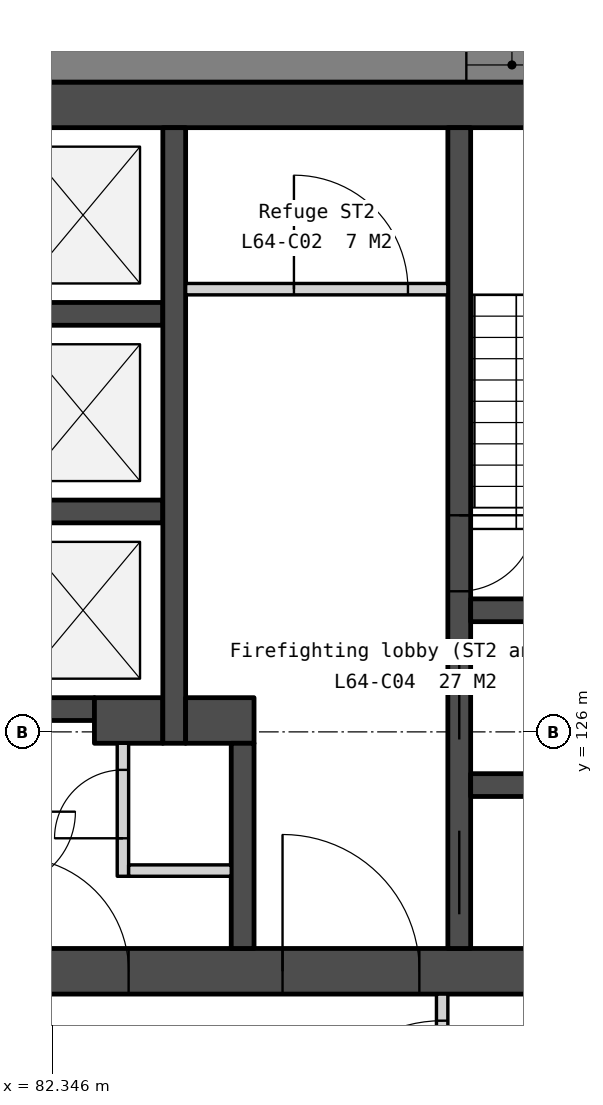
"""IFC4 building model, lengths in metres.
Left out: names, types, materials, properties, quantities, classifications, styles, units other than length and angle.
Written with IfcOpenShell. Run it as: python <this file> out.ifc"""

import sys

from ifc_helpers import new_model, si_unit, direction, frame, frame_2d, origin, place, context, subcontext, project, spatial, polyline, rectangle, outline, extrude, element, fill, save


model = new_model("IFC4")
c1 = context("Model", 3, precision=1e-05, world=origin(), true_north=direction((0.0, 1.0)))
c2 = subcontext(c1, "Body", "Model", "MODEL_VIEW")
j1 = project(units=[si_unit("LENGTHUNIT", "METRE"), si_unit("PLANEANGLEUNIT", "RADIAN")], contexts=[c1])
p1 = place(None, origin())
s1 = spatial("IfcSite", under=j1, at=p1, CompositionType="ELEMENT")
p2 = place(p1, origin())
s2 = spatial("IfcBuilding", under=s1, at=p2, CompositionType="ELEMENT")
p3 = place(p2, frame((0.0, 0.0, 262.1)))
s3 = spatial("IfcBuildingStorey", under=s2, at=p3, CompositionType="ELEMENT", Elevation=262.1)
p4 = place(p3, frame((69.0, 134.25, 0.0), z_axis=(0.0, 0.0, 1.0), x_axis=(1.0, 0.0, 0.0)))
e1 = element("IfcWall", 1, at=p4, inside=s3, PredefinedType="SOLIDWALL", context=c2, shape_type="SweptSolid", body=[
    extrude(rectangle(XDim=22.0, YDim=0.6, at=frame_2d((11.0, 0.0))), origin(), (0.0, 0.0, 1.0), 3.75),
])
p5 = place(p3, frame((69.0, 122.85, 0.0), z_axis=(0.0, 0.0, 1.0), x_axis=(1.0, 0.0, 0.0)))
e2 = element("IfcWall", 2, at=p5, inside=s3, PredefinedType="SOLIDWALL", context=c2, shape_type="SweptSolid", body=[
    extrude(rectangle(XDim=22.0, YDim=0.6, at=frame_2d((11.0, 0.0))), origin(), (0.0, 0.0, 1.0), 3.75),
])
p6 = place(p5, frame((16.375, 0.0, 0.0)))
e3 = element("IfcOpeningElement", 3, at=p6, cuts=e2, PredefinedType="OPENING", context=c2, shape_type="SweptSolid", body=[
    extrude(rectangle(XDim=1.8, YDim=2.1, at=frame_2d((0.9, 1.05))), frame((0.0, 0.31, 0.0), z_axis=(0.0, -1.0, 0.0), x_axis=(1.0, 0.0, 0.0)), (0.0, 0.0, 1.0), 0.62),
])
p7 = place(p5, frame((3.825, 0.0, 0.0)))
e4 = element("IfcOpeningElement", 4, at=p7, cuts=e2, PredefinedType="OPENING", context=c2, shape_type="SweptSolid", body=[
    extrude(rectangle(XDim=1.8, YDim=2.1, at=frame_2d((0.9, 1.05))), frame((0.0, 0.31, 0.0), z_axis=(0.0, -1.0, 0.0), x_axis=(1.0, 0.0, 0.0)), (0.0, 0.0, 1.0), 0.62),
])
p8 = place(p5, frame((12.85, 0.0, 0.0)))
e5 = element("IfcOpeningElement", 5, at=p8, cuts=e2, PredefinedType="OPENING", context=c2, shape_type="SweptSolid", body=[
    extrude(rectangle(XDim=1.5, YDim=2.1, at=frame_2d((0.75, 1.05))), frame((0.0, 0.31, 0.0), z_axis=(0.0, -1.0, 0.0), x_axis=(1.0, 0.0, 0.0)), (0.0, 0.0, 1.0), 0.62),
])
for number, where, z_axis, x_axis in (
    (6, (81.7, 131.5, 0.0), (0.0, 0.0, 1.0), (1.0, 0.0, 0.0)),
    (7, (81.7, 128.9, 0.0), (0.0, 0.0, 1.0), (1.0, 0.0, 0.0)),
):
    element("IfcWall", number, at=place(p3, frame(where, z_axis=z_axis, x_axis=x_axis)), inside=s3, PredefinedType="SOLIDWALL", context=c2, shape_type="SweptSolid", body=[
        extrude(rectangle(XDim=2.1, YDim=0.3, at=frame_2d((1.05, 0.0))), origin(), (0.0, 0.0, 1.0), 3.75),
    ])
p9 = place(p3, frame((81.7, 126.3, 0.0), z_axis=(0.0, 0.0, 1.0), x_axis=(1.0, 0.0, 0.0)))
e8 = element("IfcWall", 8, at=p9, inside=s3, PredefinedType="SOLIDWALL", context=c2, shape_type="SweptSolid", body=[
    extrude(rectangle(XDim=1.2, YDim=0.3, at=frame_2d((0.6, 0.0))), origin(), (0.0, 0.0, 1.0), 3.75),
])
p10 = place(p3, frame((82.9, 126.15, 0.0), z_axis=(0.0, 0.0, 1.0), x_axis=(1.0, 0.0, 0.0)))
e9 = element("IfcWall", 9, at=p10, inside=s3, PredefinedType="SOLIDWALL", context=c2, shape_type="SweptSolid", body=[
    extrude(rectangle(XDim=0.9, YDim=0.6, at=frame_2d((0.45, 0.0))), origin(), (0.0, 0.0, 1.0), 3.75),
])
p11 = place(p3, frame((83.275, 125.85, 0.0), z_axis=(0.0, 0.0, 1.0), x_axis=(0.0, -1.0, 0.0)))
e10 = element("IfcWall", 10, at=p11, inside=s3, PredefinedType="PARTITIONING", context=c2, shape_type="SweptSolid", body=[
    extrude(rectangle(XDim=1.75, YDim=0.15, at=frame_2d((0.875, 0.0))), origin(), (0.0, 0.0, 1.0), 3.75),
])
p12 = place(p11, frame((0.35, 0.0, 0.0)))
e11 = element("IfcOpeningElement", 11, at=p12, cuts=e10, PredefinedType="OPENING", context=c2, shape_type="SweptSolid", body=[
    extrude(rectangle(XDim=0.9, YDim=2.1, at=frame_2d((0.45, 1.05))), frame((0.0, 0.085, 0.0), z_axis=(0.0, -1.0, 0.0), x_axis=(1.0, 0.0, 0.0)), (0.0, 0.0, 1.0), 0.17),
])
p13 = place(p3, frame((83.35, 124.175, 0.0), z_axis=(0.0, 0.0, 1.0), x_axis=(1.0, 0.0, 0.0)))
e12 = element("IfcWall", 12, at=p13, inside=s3, PredefinedType="PARTITIONING", context=c2, shape_type="SweptSolid", body=[
    extrude(rectangle(XDim=1.35, YDim=0.15, at=frame_2d((0.675, 0.0))), origin(), (0.0, 0.0, 1.0), 3.75),
])
p14 = place(p3, frame((83.95, 133.95, 0.0), z_axis=(0.0, 0.0, 1.0), x_axis=(0.0, -1.0, 0.0)))
e13 = element("IfcWall", 13, at=p14, inside=s3, PredefinedType="SOLIDWALL", context=c2, shape_type="SweptSolid", body=[
    extrude(rectangle(XDim=8.1, YDim=0.3, at=frame_2d((4.05, 0.0))), origin(), (0.0, 0.0, 1.0), 3.75),
])
p15 = place(p3, frame((84.1, 131.825, 0.0), z_axis=(0.0, 0.0, 1.0), x_axis=(1.0, 0.0, 0.0)))
e14 = element("IfcWall", 14, at=p15, inside=s3, PredefinedType="PARTITIONING", context=c2, shape_type="SweptSolid", body=[
    extrude(rectangle(XDim=3.45, YDim=0.15, at=frame_2d((1.725, 0.0))), origin(), (0.0, 0.0, 1.0), 3.75),
])
p16 = place(p15, frame((1.425, 0.0, 0.0)))
e15 = element("IfcOpeningElement", 15, at=p16, cuts=e14, PredefinedType="OPENING", context=c2, shape_type="SweptSolid", body=[
    extrude(rectangle(XDim=1.5, YDim=2.1, at=frame_2d((0.75, 1.05))), frame((0.0, 0.085, 0.0), z_axis=(0.0, -1.0, 0.0), x_axis=(1.0, 0.0, 0.0)), (0.0, 0.0, 1.0), 0.17),
])
p17 = place(p3, frame((84.1, 126.15, 0.0), z_axis=(0.0, 0.0, 1.0), x_axis=(1.0, 0.0, 0.0)))
e16 = element("IfcWall", 16, at=p17, inside=s3, PredefinedType="SOLIDWALL", context=c2, shape_type="SweptSolid", body=[
    extrude(rectangle(XDim=0.9, YDim=0.6, at=frame_2d((0.45, 0.0))), origin(), (0.0, 0.0, 1.0), 3.75),
])
p18 = place(p3, frame((84.85, 125.85, 0.0), z_axis=(0.0, 0.0, 1.0), x_axis=(0.0, -1.0, 0.0)))
e17 = element("IfcWall", 17, at=p18, inside=s3, PredefinedType="SOLIDWALL", context=c2, shape_type="SweptSolid", body=[
    extrude(rectangle(XDim=2.7, YDim=0.3, at=frame_2d((1.35, 0.0))), origin(), (0.0, 0.0, 1.0), 3.75),
])
p19 = place(p3, frame((87.7, 133.95, 0.0), z_axis=(0.0, 0.0, 1.0), x_axis=(0.0, -1.0, 0.0)))
e18 = element("IfcWall", 18, at=p19, inside=s3, PredefinedType="SOLIDWALL", context=c2, shape_type="SweptSolid", body=[
    extrude(rectangle(XDim=10.8, YDim=0.3, at=frame_2d((5.4, 0.0))), origin(), (0.0, 0.0, 1.0), 3.75),
])
p20 = place(p19, frame((6.95, 0.0, 0.0)))
e19 = element("IfcOpeningElement", 19, at=p20, cuts=e18, PredefinedType="OPENING", context=c2, shape_type="SweptSolid", body=[
    extrude(rectangle(XDim=1.1, YDim=2.1, at=frame_2d((0.55, 1.05))), frame((0.0, 0.16, 0.0), z_axis=(0.0, -1.0, 0.0), x_axis=(1.0, 0.0, 0.0)), (0.0, 0.0, 1.0), 0.32),
])
p21 = place(p19, frame((5.1, 0.0, 0.0)))
e20 = element("IfcOpeningElement", 20, at=p21, cuts=e18, PredefinedType="OPENING", context=c2, shape_type="SweptSolid", body=[
    extrude(rectangle(XDim=1.0, YDim=2.1, at=frame_2d((0.5, 1.05))), frame((0.0, 0.16, 0.0), z_axis=(0.0, -1.0, 0.0), x_axis=(1.0, 0.0, 0.0)), (0.0, 0.0, 1.0), 0.32),
])
p22 = place(p19, frame((9.25, 0.0, 0.0)))
e21 = element("IfcOpeningElement", 21, at=p22, cuts=e18, PredefinedType="OPENING", context=c2, shape_type="SweptSolid", body=[
    extrude(rectangle(XDim=1.1, YDim=2.1, at=frame_2d((0.55, 1.05))), frame((0.0, 0.16, 0.0), z_axis=(0.0, -1.0, 0.0), x_axis=(1.0, 0.0, 0.0)), (0.0, 0.0, 1.0), 0.32),
])
for number, where, z_axis, x_axis in (
    (22, (87.85, 127.6, 0.0), (0.0, 0.0, 1.0), (1.0, 0.0, 0.0)),
    (23, (87.85, 125.3, 0.0), (0.0, 0.0, 1.0), (1.0, 0.0, 0.0)),
):
    element("IfcWall", number, at=place(p3, frame(where, z_axis=z_axis, x_axis=x_axis)), inside=s3, PredefinedType="SOLIDWALL", context=c2, shape_type="SweptSolid", body=[
        extrude(rectangle(XDim=2.55, YDim=0.3, at=frame_2d((1.275, 0.0))), origin(), (0.0, 0.0, 1.0), 3.75),
    ])
p23 = place(p3, frame((98.486, 134.775, -0.15), z_axis=(0.0, 0.0, 1.0), x_axis=(-1.0, 0.0, 0.0)))
e24 = element("IfcWall", 24, at=p23, inside=s3, PredefinedType="SOLIDWALL", context=c2, shape_type="SweptSolid", body=[
    extrude(outline(polyline([(36.972, 0.0), (36.972, 3.9), (0.0, 3.9), (0.0, 0.0), (36.972, 0.0)])), frame((0.0, 0.225, 0.0), z_axis=(0.0, -1.0, 0.0), x_axis=(1.0, 0.0, 0.0)), (0.0, 0.0, 1.0), 0.45),
])
p24 = place(p23, frame((0.744, 0.0, 0.95)))
e25 = element("IfcOpeningElement", 25, at=p24, cuts=e24, PredefinedType="OPENING", context=c2, shape_type="SweptSolid", body=[
    extrude(rectangle(XDim=1.2, YDim=2.2, at=frame_2d((0.6, 1.1))), frame((0.0, 0.235, 0.0), z_axis=(0.0, -1.0, 0.0), x_axis=(1.0, 0.0, 0.0)), (0.0, 0.0, 1.0), 0.47),
])
p25 = place(p23, frame((7.793, 0.0, 0.95)))
e26 = element("IfcOpeningElement", 26, at=p25, cuts=e24, PredefinedType="OPENING", context=c2, shape_type="SweptSolid", body=[
    extrude(rectangle(XDim=1.2, YDim=2.2, at=frame_2d((0.6, 1.1))), frame((0.0, 0.235, 0.0), z_axis=(0.0, -1.0, 0.0), x_axis=(1.0, 0.0, 0.0)), (0.0, 0.0, 1.0), 0.47),
])
p26 = place(p23, frame((9.493, 0.0, 0.95)))
e27 = element("IfcOpeningElement", 27, at=p26, cuts=e24, PredefinedType="OPENING", context=c2, shape_type="SweptSolid", body=[
    extrude(rectangle(XDim=1.2, YDim=2.2, at=frame_2d((0.6, 1.1))), frame((0.0, 0.235, 0.0), z_axis=(0.0, -1.0, 0.0), x_axis=(1.0, 0.0, 0.0)), (0.0, 0.0, 1.0), 0.47),
])
p27 = place(p23, frame((17.036, 0.0, 0.95)))
e28 = element("IfcOpeningElement", 28, at=p27, cuts=e24, PredefinedType="OPENING", context=c2, shape_type="SweptSolid", body=[
    extrude(rectangle(XDim=1.2, YDim=2.2, at=frame_2d((0.6, 1.1))), frame((0.0, 0.235, 0.0), z_axis=(0.0, -1.0, 0.0), x_axis=(1.0, 0.0, 0.0)), (0.0, 0.0, 1.0), 0.47),
])
p28 = place(p23, frame((18.736, 0.0, 0.95)))
e29 = element("IfcOpeningElement", 29, at=p28, cuts=e24, PredefinedType="OPENING", context=c2, shape_type="SweptSolid", body=[
    extrude(rectangle(XDim=1.2, YDim=2.2, at=frame_2d((0.6, 1.1))), frame((0.0, 0.235, 0.0), z_axis=(0.0, -1.0, 0.0), x_axis=(1.0, 0.0, 0.0)), (0.0, 0.0, 1.0), 0.47),
])
p29 = place(p23, frame((26.279, 0.0, 0.95)))
e30 = element("IfcOpeningElement", 30, at=p29, cuts=e24, PredefinedType="OPENING", context=c2, shape_type="SweptSolid", body=[
    extrude(rectangle(XDim=1.2, YDim=2.2, at=frame_2d((0.6, 1.1))), frame((0.0, 0.235, 0.0), z_axis=(0.0, -1.0, 0.0), x_axis=(1.0, 0.0, 0.0)), (0.0, 0.0, 1.0), 0.47),
])
p30 = place(p23, frame((27.979, 0.0, 0.95)))
e31 = element("IfcOpeningElement", 31, at=p30, cuts=e24, PredefinedType="OPENING", context=c2, shape_type="SweptSolid", body=[
    extrude(rectangle(XDim=1.2, YDim=2.2, at=frame_2d((0.6, 1.1))), frame((0.0, 0.235, 0.0), z_axis=(0.0, -1.0, 0.0), x_axis=(1.0, 0.0, 0.0)), (0.0, 0.0, 1.0), 0.47),
])
p31 = place(p23, frame((35.028, 0.0, 0.95)))
e32 = element("IfcOpeningElement", 32, at=p31, cuts=e24, PredefinedType="OPENING", context=c2, shape_type="SweptSolid", body=[
    extrude(rectangle(XDim=1.2, YDim=2.2, at=frame_2d((0.6, 1.1))), frame((0.0, 0.235, 0.0), z_axis=(0.0, -1.0, 0.0), x_axis=(1.0, 0.0, 0.0)), (0.0, 0.0, 1.0), 0.47),
])
p32 = place(p3, frame((80.905, 101.188, -0.15), z_axis=(0.0, 0.0, 1.0), x_axis=(0.500002536638, 0.866023939251, 0.0)))
e33 = element("IfcWall", 33, at=p32, inside=s3, PredefinedType="SOLIDWALL", context=c2, shape_type="SweptSolid", body=[
    extrude(outline(polyline([(36.972, 0.0), (36.972, 3.9), (0.0, 3.9), (0.0, 0.0), (36.972, 0.0)])), frame((0.0, 0.225, 0.0), z_axis=(0.0, -1.0, 0.0), x_axis=(1.0, 0.0, 0.0)), (0.0, 0.0, 1.0), 0.45),
])
p33 = place(p32, frame((0.744, 0.0, 0.95)))
e34 = element("IfcOpeningElement", 34, at=p33, cuts=e33, PredefinedType="OPENING", context=c2, shape_type="SweptSolid", body=[
    extrude(rectangle(XDim=1.2, YDim=2.2, at=frame_2d((0.6, 1.1))), frame((0.0, 0.235, 0.0), z_axis=(0.0, -1.0, 0.0), x_axis=(1.0, 0.0, 0.0)), (0.0, 0.0, 1.0), 0.47),
])
p34 = place(p32, frame((7.793, 0.0, 0.95)))
e35 = element("IfcOpeningElement", 35, at=p34, cuts=e33, PredefinedType="OPENING", context=c2, shape_type="SweptSolid", body=[
    extrude(rectangle(XDim=1.2, YDim=2.2, at=frame_2d((0.6, 1.1))), frame((0.0, 0.235, 0.0), z_axis=(0.0, -1.0, 0.0), x_axis=(1.0, 0.0, 0.0)), (0.0, 0.0, 1.0), 0.47),
])
p35 = place(p32, frame((9.493, 0.0, 0.95)))
e36 = element("IfcOpeningElement", 36, at=p35, cuts=e33, PredefinedType="OPENING", context=c2, shape_type="SweptSolid", body=[
    extrude(rectangle(XDim=1.2, YDim=2.2, at=frame_2d((0.6, 1.1))), frame((0.0, 0.235, 0.0), z_axis=(0.0, -1.0, 0.0), x_axis=(1.0, 0.0, 0.0)), (0.0, 0.0, 1.0), 0.47),
])
p36 = place(p32, frame((17.036, 0.0, 0.95)))
e37 = element("IfcOpeningElement", 37, at=p36, cuts=e33, PredefinedType="OPENING", context=c2, shape_type="SweptSolid", body=[
    extrude(rectangle(XDim=1.2, YDim=2.2, at=frame_2d((0.6, 1.1))), frame((0.0, 0.235, 0.0), z_axis=(0.0, -1.0, 0.0), x_axis=(1.0, 0.0, 0.0)), (0.0, 0.0, 1.0), 0.47),
])
p37 = place(p32, frame((18.736, 0.0, 0.95)))
e38 = element("IfcOpeningElement", 38, at=p37, cuts=e33, PredefinedType="OPENING", context=c2, shape_type="SweptSolid", body=[
    extrude(rectangle(XDim=1.2, YDim=2.2, at=frame_2d((0.6, 1.1))), frame((0.0, 0.235, 0.0), z_axis=(0.0, -1.0, 0.0), x_axis=(1.0, 0.0, 0.0)), (0.0, 0.0, 1.0), 0.47),
])
p38 = place(p32, frame((26.279, 0.0, 0.95)))
e39 = element("IfcOpeningElement", 39, at=p38, cuts=e33, PredefinedType="OPENING", context=c2, shape_type="SweptSolid", body=[
    extrude(rectangle(XDim=1.2, YDim=2.2, at=frame_2d((0.6, 1.1))), frame((0.0, 0.235, 0.0), z_axis=(0.0, -1.0, 0.0), x_axis=(1.0, 0.0, 0.0)), (0.0, 0.0, 1.0), 0.47),
])
p39 = place(p32, frame((27.979, 0.0, 0.95)))
e40 = element("IfcOpeningElement", 40, at=p39, cuts=e33, PredefinedType="OPENING", context=c2, shape_type="SweptSolid", body=[
    extrude(rectangle(XDim=1.2, YDim=2.2, at=frame_2d((0.6, 1.1))), frame((0.0, 0.235, 0.0), z_axis=(0.0, -1.0, 0.0), x_axis=(1.0, 0.0, 0.0)), (0.0, 0.0, 1.0), 0.47),
])
p40 = place(p32, frame((35.028, 0.0, 0.95)))
e41 = element("IfcOpeningElement", 41, at=p40, cuts=e33, PredefinedType="OPENING", context=c2, shape_type="SweptSolid", body=[
    extrude(rectangle(XDim=1.2, YDim=2.2, at=frame_2d((0.6, 1.1))), frame((0.0, 0.235, 0.0), z_axis=(0.0, -1.0, 0.0), x_axis=(1.0, 0.0, 0.0)), (0.0, 0.0, 1.0), 0.47),
])
p41 = place(p3, frame((87.475, 120.05, 0.0), z_axis=(0.0, 0.0, 1.0), x_axis=(0.0, 1.0, 0.0)))
e42 = element("IfcWall", 42, at=p41, inside=s3, PredefinedType="PARTITIONING", context=c2, shape_type="SweptSolid", body=[
    extrude(rectangle(XDim=2.5, YDim=0.15, at=frame_2d((1.25, 0.0))), origin(), (0.0, 0.0, 1.0), 3.75),
])
p42 = place(p41, frame((0.35, 0.0, 0.0)))
e43 = element("IfcOpeningElement", 43, at=p42, cuts=e42, PredefinedType="OPENING", context=c2, shape_type="SweptSolid", body=[
    extrude(rectangle(XDim=1.8, YDim=2.1, at=frame_2d((0.9, 1.05))), frame((0.0, 0.085, 0.0), z_axis=(0.0, -1.0, 0.0), x_axis=(1.0, 0.0, 0.0)), (0.0, 0.0, 1.0), 0.17),
])
p43 = place(p20, origin())
e44 = element("IfcDoor", 44, at=p43, inside=s3, OperationType="SLIDING_TO_LEFT", PredefinedType="DOOR", context=c2, shape_type="SweptSolid", body=[
    extrude(rectangle(XDim=1.1, YDim=2.1, at=frame_2d((0.55, 1.05))), frame((0.0, 0.025, 0.0), z_axis=(0.0, -1.0, 0.0), x_axis=(1.0, 0.0, 0.0)), (0.0, 0.0, 1.0), 0.05),
])
fill(e19, e44)
p44 = place(p6, origin())
e45 = element("IfcDoor", 45, at=p44, inside=s3, OperationType="DOUBLE_DOOR_DOUBLE_SWING", PredefinedType="DOOR", context=c2, shape_type="SweptSolid", body=[
    extrude(rectangle(XDim=1.8, YDim=2.1, at=frame_2d((0.9, 1.05))), frame((0.0, 0.025, 0.0), z_axis=(0.0, -1.0, 0.0), x_axis=(1.0, 0.0, 0.0)), (0.0, 0.0, 1.0), 0.05),
])
fill(e3, e45)
p45 = place(p8, origin())
e46 = element("IfcDoor", 46, at=p45, inside=s3, OperationType="DOUBLE_DOOR_DOUBLE_SWING", PredefinedType="DOOR", context=c2, shape_type="SweptSolid", body=[
    extrude(rectangle(XDim=1.5, YDim=2.1, at=frame_2d((0.75, 1.05))), frame((0.0, 0.025, 0.0), z_axis=(0.0, -1.0, 0.0), x_axis=(1.0, 0.0, 0.0)), (0.0, 0.0, 1.0), 0.05),
])
fill(e5, e46)
p46 = place(p12, origin())
e47 = element("IfcDoor", 47, at=p46, inside=s3, OperationType="SINGLE_SWING_RIGHT", PredefinedType="DOOR", context=c2, shape_type="SweptSolid", body=[
    extrude(rectangle(XDim=0.9, YDim=2.1, at=frame_2d((0.45, 1.05))), frame((0.0, 0.025, 0.0), z_axis=(0.0, -1.0, 0.0), x_axis=(1.0, 0.0, 0.0)), (0.0, 0.0, 1.0), 0.05),
])
fill(e11, e47)
p47 = place(p16, origin())
e48 = element("IfcDoor", 48, at=p47, inside=s3, OperationType="DOUBLE_DOOR_DOUBLE_SWING", PredefinedType="DOOR", context=c2, shape_type="SweptSolid", body=[
    extrude(rectangle(XDim=1.5, YDim=2.1, at=frame_2d((0.75, 1.05))), frame((0.0, 0.025, 0.0), z_axis=(0.0, -1.0, 0.0), x_axis=(1.0, 0.0, 0.0)), (0.0, 0.0, 1.0), 0.05),
])
fill(e15, e48)
p48 = place(p21, origin())
e49 = element("IfcDoor", 49, at=p48, inside=s3, OperationType="SINGLE_SWING_LEFT", PredefinedType="DOOR", context=c2, shape_type="SweptSolid", body=[
    extrude(rectangle(XDim=1.0, YDim=2.1, at=frame_2d((0.5, 1.05))), frame((0.0, 0.025, 0.0), z_axis=(0.0, -1.0, 0.0), x_axis=(1.0, 0.0, 0.0)), (0.0, 0.0, 1.0), 0.05),
])
fill(e20, e49)
p49 = place(p22, origin())
e50 = element("IfcDoor", 50, at=p49, inside=s3, OperationType="SLIDING_TO_LEFT", PredefinedType="DOOR", context=c2, shape_type="SweptSolid", body=[
    extrude(rectangle(XDim=1.1, YDim=2.1, at=frame_2d((0.55, 1.05))), frame((0.0, 0.025, 0.0), z_axis=(0.0, -1.0, 0.0), x_axis=(1.0, 0.0, 0.0)), (0.0, 0.0, 1.0), 0.05),
])
fill(e21, e50)
p50 = place(p26, origin())
e51 = element("IfcWindow", 51, at=p50, inside=s3, PartitioningType="SINGLE_PANEL", PredefinedType="WINDOW", context=c2, shape_type="SweptSolid", body=[
    extrude(rectangle(XDim=1.2, YDim=2.2, at=frame_2d((0.6, 1.1))), frame((0.0, 0.03, 0.0), z_axis=(0.0, -1.0, 0.0), x_axis=(1.0, 0.0, 0.0)), (0.0, 0.0, 1.0), 0.06),
])
fill(e27, e51)
p51 = place(p42, origin())
e52 = element("IfcDoor", 52, at=p51, inside=s3, OperationType="SINGLE_SWING_LEFT", PredefinedType="DOOR", context=c2, shape_type="SweptSolid", body=[
    extrude(rectangle(XDim=1.8, YDim=2.1, at=frame_2d((0.9, 1.05))), frame((0.0, 0.025, 0.0), z_axis=(0.0, -1.0, 0.0), x_axis=(1.0, 0.0, 0.0)), (0.0, 0.0, 1.0), 0.05),
])
fill(e43, e52)
save(model, sys.argv[1])
